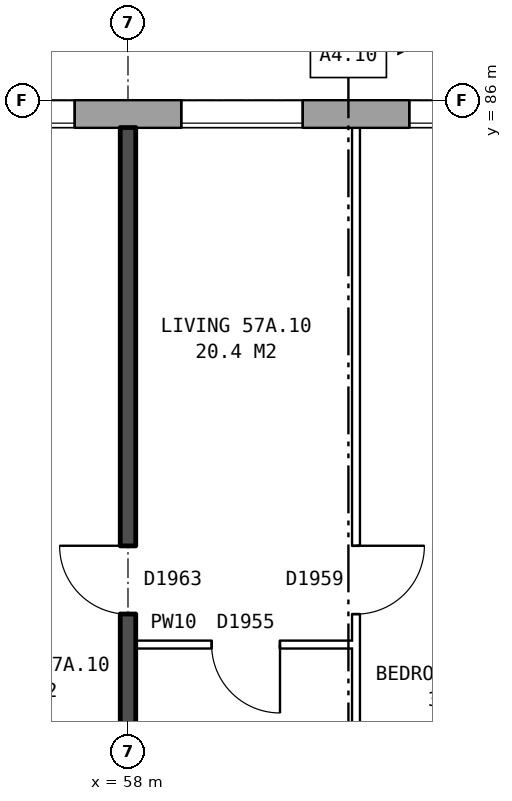
"""IFC4 building model, lengths in metres.
Left out: names, types, materials, properties, quantities, classifications, styles, units other than length and angle.
Written with IfcOpenShell. Run it as: python <this file> out.ifc"""

import sys

from ifc_helpers import new_model, si_unit, direction, frame, frame_2d, origin, place, context, subcontext, project, spatial, rectangle, extrude, element, fill, save


model = new_model("IFC4")
c1 = context("Model", 3, precision=1e-05, world=origin(), true_north=direction((0.0, 1.0)))
c2 = subcontext(c1, "Body", "Model", "MODEL_VIEW")
j1 = project(units=[si_unit("LENGTHUNIT", "METRE"), si_unit("PLANEANGLEUNIT", "RADIAN")], contexts=[c1])
p1 = place(None, origin())
s1 = spatial("IfcSite", under=j1, at=p1, CompositionType="ELEMENT")
p2 = place(p1, origin())
s2 = spatial("IfcBuilding", under=s1, at=p2, CompositionType="ELEMENT")
p3 = place(p2, frame((0.0, 0.0, 202.8)))
s3 = spatial("IfcBuildingStorey", under=s2, at=p3, CompositionType="ELEMENT", Elevation=202.8)
p4 = place(p3, frame((74.95, 85.82, 0.0), z_axis=(0.0, 0.0, 1.0), x_axis=(-1.0, 0.0, 0.0)))
e1 = element("IfcWall", 1, at=p4, inside=s3, PredefinedType="STANDARD", context=c2, shape_type="SweptSolid", body=[
    extrude(rectangle(XDim=39.875, YDim=0.36, at=frame_2d((19.938, 0.0))), origin(), (0.0, 0.0, 1.0), 2.85),
])
p5 = place(p4, frame((2.65, 0.0, 0.8)))
e2 = element("IfcOpeningElement", 2, at=p5, cuts=e1, PredefinedType="OPENING", context=c2, shape_type="SweptSolid", body=[
    extrude(rectangle(XDim=1.6, YDim=1.8, at=frame_2d((0.8, 0.9))), frame((0.0, 0.19, 0.0), z_axis=(0.0, -1.0, 0.0), x_axis=(1.0, 0.0, 0.0)), (0.0, 0.0, 1.0), 0.38),
])
p6 = place(p4, frame((5.65, 0.0, 0.8)))
e3 = element("IfcOpeningElement", 3, at=p6, cuts=e1, PredefinedType="OPENING", context=c2, shape_type="SweptSolid", body=[
    extrude(rectangle(XDim=1.6, YDim=1.8, at=frame_2d((0.8, 0.9))), frame((0.0, 0.19, 0.0), z_axis=(0.0, -1.0, 0.0), x_axis=(1.0, 0.0, 0.0)), (0.0, 0.0, 1.0), 0.38),
])
p7 = place(p4, frame((8.65, 0.0, 0.8)))
e4 = element("IfcOpeningElement", 4, at=p7, cuts=e1, PredefinedType="OPENING", context=c2, shape_type="SweptSolid", body=[
    extrude(rectangle(XDim=1.6, YDim=1.8, at=frame_2d((0.8, 0.9))), frame((0.0, 0.19, 0.0), z_axis=(0.0, -1.0, 0.0), x_axis=(1.0, 0.0, 0.0)), (0.0, 0.0, 1.0), 0.38),
])
p8 = place(p4, frame((11.65, 0.0, 0.8)))
e5 = element("IfcOpeningElement", 5, at=p8, cuts=e1, PredefinedType="OPENING", context=c2, shape_type="SweptSolid", body=[
    extrude(rectangle(XDim=1.6, YDim=1.8, at=frame_2d((0.8, 0.9))), frame((0.0, 0.19, 0.0), z_axis=(0.0, -1.0, 0.0), x_axis=(1.0, 0.0, 0.0)), (0.0, 0.0, 1.0), 0.38),
])
p9 = place(p4, frame((14.65, 0.0, 0.8)))
e6 = element("IfcOpeningElement", 6, at=p9, cuts=e1, PredefinedType="OPENING", context=c2, shape_type="SweptSolid", body=[
    extrude(rectangle(XDim=1.6, YDim=1.8, at=frame_2d((0.8, 0.9))), frame((0.0, 0.19, 0.0), z_axis=(0.0, -1.0, 0.0), x_axis=(1.0, 0.0, 0.0)), (0.0, 0.0, 1.0), 0.38),
])
p10 = place(p4, frame((17.65, 0.0, 0.8)))
e7 = element("IfcOpeningElement", 7, at=p10, cuts=e1, PredefinedType="OPENING", context=c2, shape_type="SweptSolid", body=[
    extrude(rectangle(XDim=1.6, YDim=1.8, at=frame_2d((0.8, 0.9))), frame((0.0, 0.19, 0.0), z_axis=(0.0, -1.0, 0.0), x_axis=(1.0, 0.0, 0.0)), (0.0, 0.0, 1.0), 0.38),
])
p11 = place(p4, frame((20.65, 0.0, 0.8)))
e8 = element("IfcOpeningElement", 8, at=p11, cuts=e1, PredefinedType="OPENING", context=c2, shape_type="SweptSolid", body=[
    extrude(rectangle(XDim=1.6, YDim=1.8, at=frame_2d((0.8, 0.9))), frame((0.0, 0.19, 0.0), z_axis=(0.0, -1.0, 0.0), x_axis=(1.0, 0.0, 0.0)), (0.0, 0.0, 1.0), 0.38),
])
p12 = place(p4, frame((23.65, 0.0, 0.8)))
e9 = element("IfcOpeningElement", 9, at=p12, cuts=e1, PredefinedType="OPENING", context=c2, shape_type="SweptSolid", body=[
    extrude(rectangle(XDim=1.6, YDim=1.8, at=frame_2d((0.8, 0.9))), frame((0.0, 0.19, 0.0), z_axis=(0.0, -1.0, 0.0), x_axis=(1.0, 0.0, 0.0)), (0.0, 0.0, 1.0), 0.38),
])
p13 = place(p4, frame((26.65, 0.0, 0.8)))
e10 = element("IfcOpeningElement", 10, at=p13, cuts=e1, PredefinedType="OPENING", context=c2, shape_type="SweptSolid", body=[
    extrude(rectangle(XDim=1.6, YDim=1.8, at=frame_2d((0.8, 0.9))), frame((0.0, 0.19, 0.0), z_axis=(0.0, -1.0, 0.0), x_axis=(1.0, 0.0, 0.0)), (0.0, 0.0, 1.0), 0.38),
])
p14 = place(p4, frame((29.65, 0.0, 0.8)))
e11 = element("IfcOpeningElement", 11, at=p14, cuts=e1, PredefinedType="OPENING", context=c2, shape_type="SweptSolid", body=[
    extrude(rectangle(XDim=1.6, YDim=1.8, at=frame_2d((0.8, 0.9))), frame((0.0, 0.19, 0.0), z_axis=(0.0, -1.0, 0.0), x_axis=(1.0, 0.0, 0.0)), (0.0, 0.0, 1.0), 0.38),
])
p15 = place(p4, frame((32.65, 0.0, 0.8)))
e12 = element("IfcOpeningElement", 12, at=p15, cuts=e1, PredefinedType="OPENING", context=c2, shape_type="SweptSolid", body=[
    extrude(rectangle(XDim=1.6, YDim=1.8, at=frame_2d((0.8, 0.9))), frame((0.0, 0.19, 0.0), z_axis=(0.0, -1.0, 0.0), x_axis=(1.0, 0.0, 0.0)), (0.0, 0.0, 1.0), 0.38),
])
p16 = place(p4, frame((35.65, 0.0, 0.8)))
e13 = element("IfcOpeningElement", 13, at=p16, cuts=e1, PredefinedType="OPENING", context=c2, shape_type="SweptSolid", body=[
    extrude(rectangle(XDim=1.6, YDim=1.8, at=frame_2d((0.8, 0.9))), frame((0.0, 0.19, 0.0), z_axis=(0.0, -1.0, 0.0), x_axis=(1.0, 0.0, 0.0)), (0.0, 0.0, 1.0), 0.38),
])
p17 = place(p3, frame((58.1, 78.84, 0.0), z_axis=(0.0, 0.0, 1.0), x_axis=(1.0, 0.0, 0.0)))
e14 = element("IfcWall", 14, at=p17, inside=s3, PredefinedType="PARTITIONING", context=c2, shape_type="SweptSolid", body=[
    extrude(rectangle(XDim=2.9, YDim=0.1, at=frame_2d((1.45, 0.0))), origin(), (0.0, 0.0, 1.0), 2.85),
])
p18 = place(p17, frame((1.0, 0.0, 0.0)))
e15 = element("IfcOpeningElement", 15, at=p18, cuts=e14, PredefinedType="OPENING", context=c2, shape_type="SweptSolid", body=[
    extrude(rectangle(XDim=0.9, YDim=2.1, at=frame_2d((0.45, 1.05))), frame((0.0, 0.06, 0.0), z_axis=(0.0, -1.0, 0.0), x_axis=(1.0, 0.0, 0.0)), (0.0, 0.0, 1.0), 0.12),
])
p19 = place(p3, frame((58.0, 71.2, 0.0), z_axis=(0.0, 0.0, 1.0), x_axis=(0.0, 1.0, 0.0)))
e16 = element("IfcWall", 16, at=p19, inside=s3, PredefinedType="SOLIDWALL", context=c2, shape_type="SweptSolid", body=[
    extrude(rectangle(XDim=14.44, YDim=0.2, at=frame_2d((7.22, 0.0))), origin(), (0.0, 0.0, 1.0), 2.85),
])
p20 = place(p19, frame((8.04, 0.0, 0.0)))
e17 = element("IfcOpeningElement", 17, at=p20, cuts=e16, PredefinedType="OPENING", context=c2, shape_type="SweptSolid", body=[
    extrude(rectangle(XDim=0.9, YDim=2.1, at=frame_2d((0.45, 1.05))), frame((0.0, 0.11, 0.0), z_axis=(0.0, -1.0, 0.0), x_axis=(1.0, 0.0, 0.0)), (0.0, 0.0, 1.0), 0.22),
])
p21 = place(p19, frame((0.4, 0.0, 0.0)))
e18 = element("IfcOpeningElement", 18, at=p21, cuts=e16, PredefinedType="OPENING", context=c2, shape_type="SweptSolid", body=[
    extrude(rectangle(XDim=0.9, YDim=2.1, at=frame_2d((0.45, 1.05))), frame((0.0, 0.11, 0.0), z_axis=(0.0, -1.0, 0.0), x_axis=(1.0, 0.0, 0.0)), (0.0, 0.0, 1.0), 0.22),
])
p22 = place(p3, frame((61.0, 71.3, 0.0), z_axis=(0.0, 0.0, 1.0), x_axis=(0.0, 1.0, 0.0)))
e19 = element("IfcWall", 19, at=p22, inside=s3, PredefinedType="PARTITIONING", context=c2, shape_type="SweptSolid", body=[
    extrude(rectangle(XDim=14.34, YDim=0.1, at=frame_2d((7.17, 0.0))), origin(), (0.0, 0.0, 1.0), 2.85),
])
p23 = place(p22, frame((7.94, 0.0, 0.0)))
e20 = element("IfcOpeningElement", 20, at=p23, cuts=e19, PredefinedType="OPENING", context=c2, shape_type="SweptSolid", body=[
    extrude(rectangle(XDim=0.9, YDim=2.1, at=frame_2d((0.45, 1.05))), frame((0.0, 0.06, 0.0), z_axis=(0.0, -1.0, 0.0), x_axis=(1.0, 0.0, 0.0)), (0.0, 0.0, 1.0), 0.12),
])
p24 = place(p22, frame((0.4, 0.0, 0.0)))
e21 = element("IfcOpeningElement", 21, at=p24, cuts=e19, PredefinedType="OPENING", context=c2, shape_type="SweptSolid", body=[
    extrude(rectangle(XDim=0.9, YDim=2.1, at=frame_2d((0.45, 1.05))), frame((0.0, 0.06, 0.0), z_axis=(0.0, -1.0, 0.0), x_axis=(1.0, 0.0, 0.0)), (0.0, 0.0, 1.0), 0.12),
])
p25 = place(p8, origin())
e22 = element("IfcWindow", 22, at=p25, inside=s3, PartitioningType="SINGLE_PANEL", PredefinedType="WINDOW", context=c2, shape_type="SweptSolid", body=[
    extrude(rectangle(XDim=1.6, YDim=1.8, at=frame_2d((0.8, 0.9))), frame((0.0, 0.15, 0.0), z_axis=(0.0, -1.0, 0.0), x_axis=(1.0, 0.0, 0.0)), (0.0, 0.0, 1.0), 0.06),
])
fill(e5, e22)
p26 = place(p9, origin())
e23 = element("IfcWindow", 23, at=p26, inside=s3, PartitioningType="SINGLE_PANEL", PredefinedType="WINDOW", context=c2, shape_type="SweptSolid", body=[
    extrude(rectangle(XDim=1.6, YDim=1.8, at=frame_2d((0.8, 0.9))), frame((0.0, 0.15, 0.0), z_axis=(0.0, -1.0, 0.0), x_axis=(1.0, 0.0, 0.0)), (0.0, 0.0, 1.0), 0.06),
])
fill(e6, e23)
p27 = place(p10, origin())
e24 = element("IfcWindow", 24, at=p27, inside=s3, PartitioningType="SINGLE_PANEL", PredefinedType="WINDOW", context=c2, shape_type="SweptSolid", body=[
    extrude(rectangle(XDim=1.6, YDim=1.8, at=frame_2d((0.8, 0.9))), frame((0.0, 0.15, 0.0), z_axis=(0.0, -1.0, 0.0), x_axis=(1.0, 0.0, 0.0)), (0.0, 0.0, 1.0), 0.06),
])
fill(e7, e24)
p28 = place(p23, frame((0.9, 0.0, 0.0), z_axis=(0.0, 0.0, 1.0), x_axis=(-1.0, 0.0, 0.0)))
e25 = element("IfcDoor", 25, at=p28, inside=s3, OperationType="SINGLE_SWING_LEFT", PredefinedType="DOOR", context=c2, shape_type="SweptSolid", body=[
    extrude(rectangle(XDim=0.9, YDim=2.1, at=frame_2d((0.45, 1.05))), frame((0.0, 0.025, 0.0), z_axis=(0.0, -1.0, 0.0), x_axis=(1.0, 0.0, 0.0)), (0.0, 0.0, 1.0), 0.05),
])
fill(e20, e25)
p29 = place(p20, origin())
e26 = element("IfcDoor", 26, at=p29, inside=s3, OperationType="SINGLE_SWING_RIGHT", PredefinedType="DOOR", context=c2, shape_type="SweptSolid", body=[
    extrude(rectangle(XDim=0.9, YDim=2.1, at=frame_2d((0.45, 1.05))), frame((0.0, 0.025, 0.0), z_axis=(0.0, -1.0, 0.0), x_axis=(1.0, 0.0, 0.0)), (0.0, 0.0, 1.0), 0.05),
])
fill(e17, e26)
p30 = place(p18, frame((0.9, 0.0, 0.0), z_axis=(0.0, 0.0, 1.0), x_axis=(-1.0, 0.0, 0.0)))
e27 = element("IfcDoor", 27, at=p30, inside=s3, OperationType="SINGLE_SWING_LEFT", PredefinedType="DOOR", context=c2, shape_type="SweptSolid", body=[
    extrude(rectangle(XDim=0.9, YDim=2.1, at=frame_2d((0.45, 1.05))), frame((0.0, 0.025, 0.0), z_axis=(0.0, -1.0, 0.0), x_axis=(1.0, 0.0, 0.0)), (0.0, 0.0, 1.0), 0.05),
])
fill(e15, e27)
save(model, sys.argv[1])
